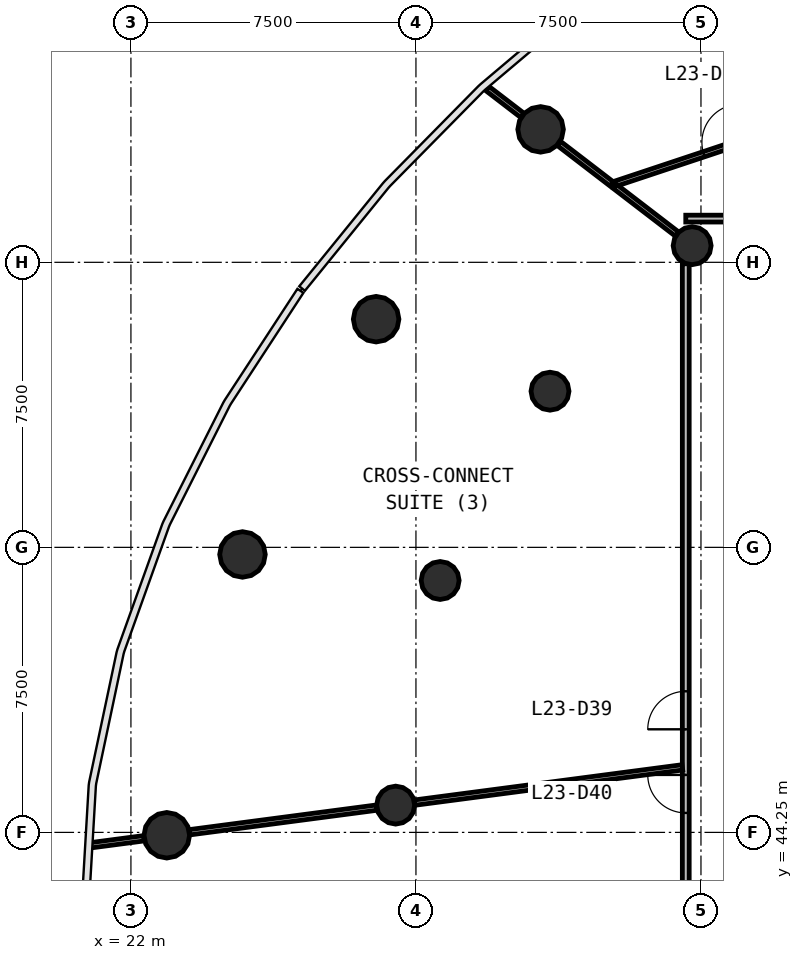
"""IFC4 building model, lengths in metres.
Left out: names, types, materials, properties, quantities, classifications, styles, units other than length and angle.
Written with IfcOpenShell. Run it as: python <this file> out.ifc"""

import sys

from ifc_helpers import new_model, si_unit, direction, frame, frame_2d, origin, origin_2d, place, context, subcontext, project, spatial, rectangle, circle, extrude, source, transform, mapped, element, fill, save


model = new_model("IFC4")
c1 = context("Model", 3, precision=1e-05, world=origin(), true_north=direction((0.0, 1.0)))
c2 = subcontext(c1, "Body", "Model", "MODEL_VIEW")
j1 = project(units=[si_unit("LENGTHUNIT", "METRE"), si_unit("PLANEANGLEUNIT", "RADIAN")], contexts=[c1])
p1 = place(None, origin())
s1 = spatial("IfcSite", under=j1, at=p1, CompositionType="ELEMENT")
p2 = place(p1, origin())
s2 = spatial("IfcBuilding", under=s1, at=p2, CompositionType="ELEMENT")
p3 = place(p2, frame((0.0, 0.0, 100.3)))
s3 = spatial("IfcBuildingStorey", under=s2, at=p3, CompositionType="ELEMENT", Elevation=100.3)
m1 = source(origin(), c2, "Body", "SweptSolid", [
    extrude(circle(Radius=0.6, at=origin_2d()), origin(), (0.0, 0.0, 1.0), 4.1),
])
for number, where, z_axis, x_axis in (
    (1, (32.78, 62.748, 0.0), (0.0, 0.0, 1.0), (1.0, 0.0, 0.0)),
    (2, (28.452, 57.754, 0.0), (0.0, 0.0, 1.0), (1.0, 0.0, 0.0)),
    (3, (24.936, 51.563, 0.0), (0.0, 0.0, 1.0), (1.0, 0.0, 0.0)),
    (4, (22.944, 44.175, 0.0), (0.0, 0.0, 1.0), (1.0, 0.0, 0.0)),
):
    element("IfcColumn", number, at=place(p3, frame(where, z_axis=z_axis, x_axis=x_axis)), inside=s3, PredefinedType="COLUMN", context=c2, shape_type="MappedRepresentation", body=[
        mapped(m1, transform((0.0, 0.0, 0.0), scale=1.0)),
    ])
m2 = source(origin(), c2, "Body", "SweptSolid", [
    extrude(circle(Radius=0.5, at=origin_2d()), origin(), (0.0, 0.0, 1.0), 4.1),
])
for number, where, z_axis, x_axis in (
    (5, (36.768, 59.688, 0.0), (0.0, 0.0, 1.0), (1.0, 0.0, 0.0)),
    (6, (33.028, 55.859, 0.0), (0.0, 0.0, 1.0), (1.0, 0.0, 0.0)),
    (7, (30.137, 50.878, 0.0), (0.0, 0.0, 1.0), (1.0, 0.0, 0.0)),
    (8, (28.966, 44.968, 0.0), (0.0, 0.0, 1.0), (1.0, 0.0, 0.0)),
):
    element("IfcColumn", number, at=place(p3, frame(where, z_axis=z_axis, x_axis=x_axis)), inside=s3, PredefinedType="COLUMN", context=c2, shape_type="MappedRepresentation", body=[
        mapped(m2, transform((0.0, 0.0, 0.0), scale=1.0)),
    ])
p4 = place(p3, frame((36.6, 60.4, 0.0), z_axis=(0.0, 0.0, 1.0), x_axis=(1.0, 0.0, 0.0)))
e9 = element("IfcWall", 9, at=p4, inside=s3, PredefinedType="PARTITIONING", context=c2, shape_type="SweptSolid", body=[
    extrude(rectangle(XDim=30.8, YDim=0.18, at=frame_2d((15.4, 0.0))), origin(), (0.0, 0.0, 1.0), 2.9),
])
p5 = place(p4, frame((25.55, 0.0, 0.0)))
e10 = element("IfcOpeningElement", 10, at=p5, cuts=e9, PredefinedType="OPENING", context=c2, shape_type="SweptSolid", body=[
    extrude(rectangle(XDim=1.0, YDim=2.1, at=frame_2d((0.5, 1.05))), frame((0.0, 0.1, 0.0), z_axis=(0.0, -1.0, 0.0), x_axis=(1.0, 0.0, 0.0)), (0.0, 0.0, 1.0), 0.2),
])
p6 = place(p4, frame((20.95, 0.0, 0.0)))
e11 = element("IfcOpeningElement", 11, at=p6, cuts=e9, PredefinedType="OPENING", context=c2, shape_type="SweptSolid", body=[
    extrude(rectangle(XDim=1.0, YDim=2.1, at=frame_2d((0.5, 1.05))), frame((0.0, 0.1, 0.0), z_axis=(0.0, -1.0, 0.0), x_axis=(1.0, 0.0, 0.0)), (0.0, 0.0, 1.0), 0.2),
])
p7 = place(p4, frame((14.95, 0.0, 0.0)))
e12 = element("IfcOpeningElement", 12, at=p7, cuts=e9, PredefinedType="OPENING", context=c2, shape_type="SweptSolid", body=[
    extrude(rectangle(XDim=1.0, YDim=2.1, at=frame_2d((0.5, 1.05))), frame((0.0, 0.1, 0.0), z_axis=(0.0, -1.0, 0.0), x_axis=(1.0, 0.0, 0.0)), (0.0, 0.0, 1.0), 0.2),
])
p8 = place(p4, frame((8.95, 0.0, 0.0)))
e13 = element("IfcOpeningElement", 13, at=p8, cuts=e9, PredefinedType="OPENING", context=c2, shape_type="SweptSolid", body=[
    extrude(rectangle(XDim=1.0, YDim=2.1, at=frame_2d((0.5, 1.05))), frame((0.0, 0.1, 0.0), z_axis=(0.0, -1.0, 0.0), x_axis=(1.0, 0.0, 0.0)), (0.0, 0.0, 1.0), 0.2),
])
p9 = place(p3, frame((36.6, 35.63, 0.0), z_axis=(0.0, 0.0, 1.0), x_axis=(0.0, 1.0, 0.0)))
e14 = element("IfcWall", 14, at=p9, inside=s3, PredefinedType="PARTITIONING", context=c2, shape_type="SweptSolid", body=[
    extrude(rectangle(XDim=23.583, YDim=0.18, at=frame_2d((11.791, 0.0))), origin(), (0.0, 0.0, 1.0), 2.9),
])
p10 = place(p9, frame((11.333, 0.0, 0.0)))
e15 = element("IfcOpeningElement", 15, at=p10, cuts=e14, PredefinedType="OPENING", context=c2, shape_type="SweptSolid", body=[
    extrude(rectangle(XDim=1.0, YDim=2.1, at=frame_2d((0.5, 1.05))), frame((0.0, 0.1, 0.0), z_axis=(0.0, -1.0, 0.0), x_axis=(1.0, 0.0, 0.0)), (0.0, 0.0, 1.0), 0.2),
])
p11 = place(p9, frame((9.133, 0.0, 0.0)))
e16 = element("IfcOpeningElement", 16, at=p11, cuts=e14, PredefinedType="OPENING", context=c2, shape_type="SweptSolid", body=[
    extrude(rectangle(XDim=1.0, YDim=2.1, at=frame_2d((0.5, 1.05))), frame((0.0, 0.1, 0.0), z_axis=(0.0, -1.0, 0.0), x_axis=(1.0, 0.0, 0.0)), (0.0, 0.0, 1.0), 0.2),
])
p12 = place(p3, frame((36.51, 45.961, 0.0), z_axis=(0.0, 0.0, 1.0), x_axis=(-0.99144622305, -0.130515848849, 0.0)))
e17 = element("IfcWall", 17, at=p12, inside=s3, PredefinedType="PARTITIONING", context=c2, shape_type="SweptSolid", body=[
    extrude(rectangle(XDim=7.104, YDim=0.14, at=frame_2d((3.552, 0.0))), origin(), (0.0, 0.0, 1.0), 2.9),
])
p13 = place(p3, frame((34.675, 61.294, 0.0), z_axis=(0.0, 0.0, 1.0), x_axis=(0.948817917671, 0.315823620247, 0.0)))
e18 = element("IfcWall", 18, at=p13, inside=s3, PredefinedType="PARTITIONING", context=c2, shape_type="SweptSolid", body=[
    extrude(rectangle(XDim=5.981, YDim=0.14, at=frame_2d((2.99, 0.0))), origin(), (0.0, 0.0, 1.0), 2.9),
])
p14 = place(p13, frame((2.531, 0.0, 0.0)))
e19 = element("IfcOpeningElement", 19, at=p14, cuts=e18, PredefinedType="OPENING", context=c2, shape_type="SweptSolid", body=[
    extrude(rectangle(XDim=1.0, YDim=2.1, at=frame_2d((0.5, 1.05))), frame((0.0, 0.08, 0.0), z_axis=(0.0, -1.0, 0.0), x_axis=(1.0, 0.0, 0.0)), (0.0, 0.0, 1.0), 0.16),
])
p15 = place(p3, frame((28.466, 44.902, 0.0), z_axis=(0.0, 0.0, 1.0), x_axis=(-0.991443414541, -0.130537181533, 0.0)))
e20 = element("IfcWall", 20, at=p15, inside=s3, PredefinedType="PARTITIONING", context=c2, shape_type="SweptSolid", body=[
    extrude(rectangle(XDim=4.966, YDim=0.14, at=frame_2d((2.483, 0.0))), origin(), (0.0, 0.0, 1.0), 2.9),
])
p16 = place(p3, frame((36.367, 59.995, 0.0), z_axis=(0.0, 0.0, 1.0), x_axis=(-0.793389614633, 0.608714152449, 0.0)))
e21 = element("IfcWall", 21, at=p16, inside=s3, PredefinedType="PARTITIONING", context=c2, shape_type="SweptSolid", body=[
    extrude(rectangle(XDim=2.049, YDim=0.14, at=frame_2d((1.024, 0.0))), origin(), (0.0, 0.0, 1.0), 2.9),
])
p17 = place(p3, frame((34.651, 61.312, 0.0), z_axis=(0.0, 0.0, 1.0), x_axis=(-0.793368751306, 0.608741344456, 0.0)))
e22 = element("IfcWall", 22, at=p17, inside=s3, PredefinedType="PARTITIONING", context=c2, shape_type="SweptSolid", body=[
    extrude(rectangle(XDim=1.753, YDim=0.14, at=frame_2d((0.877, 0.0))), origin(), (0.0, 0.0, 1.0), 2.9),
])
p18 = place(p3, frame((22.344, 44.096, 0.0), z_axis=(0.0, 0.0, 1.0), x_axis=(-0.991440859851, -0.130556583206, 0.0)))
e23 = element("IfcWall", 23, at=p18, inside=s3, PredefinedType="PARTITIONING", context=c2, shape_type="SweptSolid", body=[
    extrude(rectangle(XDim=1.423, YDim=0.14, at=frame_2d((0.711, 0.0))), origin(), (0.0, 0.0, 1.0), 2.9),
])
p19 = place(p3, frame((32.301, 63.116, 0.0), z_axis=(0.0, 0.0, 1.0), x_axis=(-0.793332880396, 0.608788091935, 0.0)))
e24 = element("IfcWall", 24, at=p19, inside=s3, PredefinedType="PARTITIONING", context=c2, shape_type="SweptSolid", body=[
    extrude(rectangle(XDim=1.164, YDim=0.14, at=frame_2d((0.582, 0.0))), origin(), (0.0, 0.0, 1.0), 2.9),
])
m3 = source(origin(), c2, "Body", "SweptSolid", [
    extrude(rectangle(XDim=1.0, YDim=2.1, at=frame_2d((0.5, 1.05))), frame((0.0, 0.025, 0.0), z_axis=(0.0, -1.0, 0.0), x_axis=(1.0, 0.0, 0.0)), (0.0, 0.0, 1.0), 0.05),
])
p20 = place(p14, origin())
e25 = element("IfcDoor", 25, at=p20, inside=s3, OperationType="SINGLE_SWING_RIGHT", PredefinedType="DOOR", context=c2, shape_type="MappedRepresentation", body=[
    mapped(m3, transform((0.0, 0.0, 0.0), scale=1.0)),
])
fill(e19, e25)
p21 = place(p10, origin())
e26 = element("IfcDoor", 26, at=p21, inside=s3, OperationType="SINGLE_SWING_LEFT", PredefinedType="DOOR", context=c2, shape_type="MappedRepresentation", body=[
    mapped(m3, transform((0.0, 0.0, 0.0), scale=1.0)),
])
fill(e15, e26)
p22 = place(p11, origin())
e27 = element("IfcDoor", 27, at=p22, inside=s3, OperationType="SINGLE_SWING_RIGHT", PredefinedType="DOOR", context=c2, shape_type="MappedRepresentation", body=[
    mapped(m3, transform((0.0, 0.0, 0.0), scale=1.0)),
])
fill(e16, e27)
save(model, sys.argv[1])
